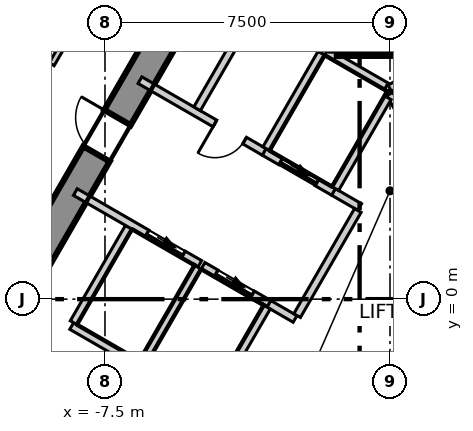
"""IFC4 building model, lengths in metres.
Left out: names, types, materials, properties, quantities, classifications, styles, units other than length and angle.
Written with IfcOpenShell. Run it as: python <this file> out.ifc"""

import sys

from ifc_helpers import new_model, si_unit, direction, frame, frame_2d, origin, place, context, subcontext, project, spatial, polyline, rectangle, outline, extrude, element, fill, save


model = new_model("IFC4")
c1 = context("Model", 3, precision=1e-05, world=origin(), true_north=direction((0.0, 1.0)))
c2 = subcontext(c1, "Body", "Model", "MODEL_VIEW")
j1 = project(units=[si_unit("LENGTHUNIT", "METRE"), si_unit("PLANEANGLEUNIT", "RADIAN")], contexts=[c1])
p1 = place(None, origin())
s1 = spatial("IfcSite", under=j1, at=p1, CompositionType="ELEMENT")
p2 = place(p1, origin())
s2 = spatial("IfcBuilding", under=s1, at=p2, CompositionType="ELEMENT")
p3 = place(p2, frame((0.0, 0.0, 164.3)))
s3 = spatial("IfcBuildingStorey", under=s2, at=p3, CompositionType="ELEMENT", Elevation=164.3)
p4 = place(p3, frame((-1.674, 14.3, -0.3), z_axis=(0.0, 0.0, 1.0), x_axis=(-0.499995765644, -0.866027848477, 0.0)))
e1 = element("IfcWall", 1, at=p4, inside=s3, PredefinedType="SHEAR", context=c2, shape_type="SweptSolid", body=[
    extrude(outline(polyline([(-0.231, -0.4), (1.732, -0.4), (3.695, -0.4), (5.658, -0.4), (7.621, -0.4), (9.584, -0.4), (11.547, -0.4), (13.51, -0.4), (15.473, -0.4), (17.436, -0.4), (19.399, -0.4), (21.362, -0.4), (23.325, -0.4), (22.863, 0.4), (20.977, 0.4), (19.091, 0.4), (17.205, 0.4), (15.319, 0.4), (13.433, 0.4), (11.547, 0.4), (9.661, 0.4), (7.775, 0.4), (5.889, 0.4), (4.003, 0.4), (2.117, 0.4), (0.231, 0.4), (-0.231, -0.4)])), origin(), (0.0, 0.0, 1.0), 4.0),
])
p5 = place(p4, frame((10.997, 0.0, 0.3)))
e2 = element("IfcOpeningElement", 2, at=p5, cuts=e1, PredefinedType="OPENING", context=c2, shape_type="SweptSolid", body=[
    extrude(rectangle(XDim=1.1, YDim=2.1, at=frame_2d((0.55, 1.05))), frame((0.0, 0.41, 0.0), z_axis=(0.0, -1.0, 0.0), x_axis=(1.0, 0.0, 0.0)), (0.0, 0.0, 1.0), 0.82),
])
p6 = place(p3, frame((-2.972, 33.16, 0.0), z_axis=(0.0, 0.0, 1.0), x_axis=(-0.500009959561, -0.866019653553, 0.0)))
e3 = element("IfcWall", 3, at=p6, inside=s3, PredefinedType="ELEMENTEDWALL", context=c2, shape_type="SweptSolid", body=[
    extrude(rectangle(XDim=54.443, YDim=0.2, at=frame_2d((27.222, 0.0))), origin(), (0.0, 0.0, 1.0), 3.7),
])
p7 = place(p6, frame((2.094, 0.0, 0.9)))
e4 = element("IfcOpeningElement", 4, at=p7, cuts=e3, PredefinedType="OPENING", context=c2, shape_type="SweptSolid", body=[
    extrude(rectangle(XDim=4.9, YDim=2.5, at=frame_2d((2.45, 1.25))), frame((0.0, 0.11, 0.0), z_axis=(0.0, -1.0, 0.0), x_axis=(1.0, 0.0, 0.0)), (0.0, 0.0, 1.0), 0.22),
])
p8 = place(p6, frame((8.576, 0.0, 0.9)))
e5 = element("IfcOpeningElement", 5, at=p8, cuts=e3, PredefinedType="OPENING", context=c2, shape_type="SweptSolid", body=[
    extrude(rectangle(XDim=4.9, YDim=2.5, at=frame_2d((2.45, 1.25))), frame((0.0, 0.11, 0.0), z_axis=(0.0, -1.0, 0.0), x_axis=(1.0, 0.0, 0.0)), (0.0, 0.0, 1.0), 0.22),
])
p9 = place(p6, frame((15.058, 0.0, 0.9)))
e6 = element("IfcOpeningElement", 6, at=p9, cuts=e3, PredefinedType="OPENING", context=c2, shape_type="SweptSolid", body=[
    extrude(rectangle(XDim=4.9, YDim=2.5, at=frame_2d((2.45, 1.25))), frame((0.0, 0.11, 0.0), z_axis=(0.0, -1.0, 0.0), x_axis=(1.0, 0.0, 0.0)), (0.0, 0.0, 1.0), 0.22),
])
p10 = place(p6, frame((21.54, 0.0, 0.9)))
e7 = element("IfcOpeningElement", 7, at=p10, cuts=e3, PredefinedType="OPENING", context=c2, shape_type="SweptSolid", body=[
    extrude(rectangle(XDim=4.9, YDim=2.5, at=frame_2d((2.45, 1.25))), frame((0.0, 0.11, 0.0), z_axis=(0.0, -1.0, 0.0), x_axis=(1.0, 0.0, 0.0)), (0.0, 0.0, 1.0), 0.22),
])
p11 = place(p6, frame((28.022, 0.0, 0.9)))
e8 = element("IfcOpeningElement", 8, at=p11, cuts=e3, PredefinedType="OPENING", context=c2, shape_type="SweptSolid", body=[
    extrude(rectangle(XDim=4.9, YDim=2.5, at=frame_2d((2.45, 1.25))), frame((0.0, 0.11, 0.0), z_axis=(0.0, -1.0, 0.0), x_axis=(1.0, 0.0, 0.0)), (0.0, 0.0, 1.0), 0.22),
])
p12 = place(p6, frame((34.505, 0.0, 0.9)))
e9 = element("IfcOpeningElement", 9, at=p12, cuts=e3, PredefinedType="OPENING", context=c2, shape_type="SweptSolid", body=[
    extrude(rectangle(XDim=4.9, YDim=2.5, at=frame_2d((2.45, 1.25))), frame((0.0, 0.11, 0.0), z_axis=(0.0, -1.0, 0.0), x_axis=(1.0, 0.0, 0.0)), (0.0, 0.0, 1.0), 0.22),
])
p13 = place(p6, frame((40.987, 0.0, 0.9)))
e10 = element("IfcOpeningElement", 10, at=p13, cuts=e3, PredefinedType="OPENING", context=c2, shape_type="SweptSolid", body=[
    extrude(rectangle(XDim=4.9, YDim=2.5, at=frame_2d((2.45, 1.25))), frame((0.0, 0.11, 0.0), z_axis=(0.0, -1.0, 0.0), x_axis=(1.0, 0.0, 0.0)), (0.0, 0.0, 1.0), 0.22),
])
p14 = place(p6, frame((47.469, 0.0, 0.9)))
e11 = element("IfcOpeningElement", 11, at=p14, cuts=e3, PredefinedType="OPENING", context=c2, shape_type="SweptSolid", body=[
    extrude(rectangle(XDim=4.9, YDim=2.5, at=frame_2d((2.45, 1.25))), frame((0.0, 0.11, 0.0), z_axis=(0.0, -1.0, 0.0), x_axis=(1.0, 0.0, 0.0)), (0.0, 0.0, 1.0), 0.22),
])
p15 = place(p3, frame((-8.903, 6.18, 0.0), z_axis=(0.0, 0.0, 1.0), x_axis=(0.500010074151, 0.866019587393, 0.0)))
e12 = element("IfcWall", 12, at=p15, inside=s3, PredefinedType="PARTITIONING", context=c2, shape_type="SweptSolid", body=[
    extrude(rectangle(XDim=17.806, YDim=0.15, at=frame_2d((8.903, 0.0))), origin(), (0.0, 0.0, 1.0), 3.7),
])
p16 = place(p15, frame((14.356, 0.0, 0.0)))
e13 = element("IfcOpeningElement", 13, at=p16, cuts=e12, PredefinedType="OPENING", context=c2, shape_type="SweptSolid", body=[
    extrude(rectangle(XDim=1.1, YDim=2.1, at=frame_2d((0.55, 1.05))), frame((0.0, 0.085, 0.0), z_axis=(0.0, -1.0, 0.0), x_axis=(1.0, 0.0, 0.0)), (0.0, 0.0, 1.0), 0.17),
])
p17 = place(p15, frame((10.014, 0.0, 0.0)))
e14 = element("IfcOpeningElement", 14, at=p17, cuts=e12, PredefinedType="OPENING", context=c2, shape_type="SweptSolid", body=[
    extrude(rectangle(XDim=0.9, YDim=2.1, at=frame_2d((0.45, 1.05))), frame((0.0, 0.085, 0.0), z_axis=(0.0, -1.0, 0.0), x_axis=(1.0, 0.0, 0.0)), (0.0, 0.0, 1.0), 0.17),
])
p18 = place(p15, frame((6.814, 0.0, 0.0)))
e15 = element("IfcOpeningElement", 15, at=p18, cuts=e12, PredefinedType="OPENING", context=c2, shape_type="SweptSolid", body=[
    extrude(rectangle(XDim=0.9, YDim=2.1, at=frame_2d((0.45, 1.05))), frame((0.0, 0.085, 0.0), z_axis=(0.0, -1.0, 0.0), x_axis=(1.0, 0.0, 0.0)), (0.0, 0.0, 1.0), 0.17),
])
p19 = place(p15, frame((4.014, 0.0, 0.0)))
e16 = element("IfcOpeningElement", 16, at=p19, cuts=e12, PredefinedType="OPENING", context=c2, shape_type="SweptSolid", body=[
    extrude(rectangle(XDim=1.0, YDim=2.1, at=frame_2d((0.5, 1.05))), frame((0.0, 0.085, 0.0), z_axis=(0.0, -1.0, 0.0), x_axis=(1.0, 0.0, 0.0)), (0.0, 0.0, 1.0), 0.17),
])
p20 = place(p3, frame((0.076, 21.468, 0.0), z_axis=(0.0, 0.0, 1.0), x_axis=(0.500024127084, -0.866011473558, 0.0)))
e17 = element("IfcWall", 17, at=p20, inside=s3, PredefinedType="PARTITIONING", context=c2, shape_type="SweptSolid", body=[
    extrude(rectangle(XDim=17.654, YDim=0.15, at=frame_2d((8.827, 0.0))), origin(), (0.0, 0.0, 1.0), 3.7),
])
p21 = place(p20, frame((11.104, 0.0, 0.0)))
e18 = element("IfcOpeningElement", 18, at=p21, cuts=e17, PredefinedType="OPENING", context=c2, shape_type="SweptSolid", body=[
    extrude(rectangle(XDim=1.1, YDim=2.1, at=frame_2d((0.55, 1.05))), frame((0.0, 0.085, 0.0), z_axis=(0.0, -1.0, 0.0), x_axis=(1.0, 0.0, 0.0)), (0.0, 0.0, 1.0), 0.17),
])
p22 = place(p20, frame((2.14, 0.0, 0.0)))
e19 = element("IfcOpeningElement", 19, at=p22, cuts=e17, PredefinedType="OPENING", context=c2, shape_type="SweptSolid", body=[
    extrude(rectangle(XDim=1.1, YDim=2.1, at=frame_2d((0.55, 1.05))), frame((0.0, 0.085, 0.0), z_axis=(0.0, -1.0, 0.0), x_axis=(1.0, 0.0, 0.0)), (0.0, 0.0, 1.0), 0.17),
])
p23 = place(p3, frame((-8.376, -0.707, 0.0), z_axis=(0.0, 0.0, 1.0), x_axis=(0.866067520717, -0.499927044236, 0.0)))
e20 = element("IfcWall", 20, at=p23, inside=s3, PredefinedType="SOLIDWALL", context=c2, shape_type="SweptSolid", body=[
    extrude(rectangle(XDim=2.1, YDim=0.2, at=frame_2d((1.05, 0.0))), origin(), (0.0, 0.0, 1.0), 3.7),
])
p24 = place(p3, frame((-8.326, -0.62, 0.0), z_axis=(0.0, 0.0, 1.0), x_axis=(0.500023687443, 0.866011727401, 0.0)))
e21 = element("IfcWall", 21, at=p24, inside=s3, PredefinedType="SOLIDWALL", context=c2, shape_type="SweptSolid", body=[
    extrude(rectangle(XDim=2.9, YDim=0.2, at=frame_2d((1.45, 0.0))), origin(), (0.0, 0.0, 1.0), 3.7),
])
p25 = place(p3, frame((-0.002, 5.542, 0.0), z_axis=(0.0, 0.0, 1.0), x_axis=(0.866103910842, 0.499863997127, 0.0)))
e22 = element("IfcWall", 22, at=p25, inside=s3, PredefinedType="SOLIDWALL", context=c2, shape_type="SweptSolid", body=[
    extrude(rectangle(XDim=4.131, YDim=0.2, at=frame_2d((2.065, 0.0))), origin(), (0.0, 0.0, 1.0), 3.7),
])
p26 = place(p3, frame((0.0, 5.4, 0.0), z_axis=(0.0, 0.0, 1.0), x_axis=(0.500103862429, -0.865965430478, 0.0)))
e23 = element("IfcWall", 23, at=p26, inside=s3, PredefinedType="SOLIDWALL", context=c2, shape_type="SweptSolid", body=[
    extrude(rectangle(XDim=2.973, YDim=0.2, at=frame_2d((1.487, 0.0))), origin(), (0.0, 0.0, 1.0), 3.7),
])
p27 = place(p26, frame((0.937, 0.0, 0.0)))
e24 = element("IfcOpeningElement", 24, at=p27, cuts=e23, PredefinedType="OPENING", context=c2, shape_type="SweptSolid", body=[
    extrude(rectangle(XDim=1.1, YDim=2.1, at=frame_2d((0.55, 1.05))), frame((0.0, 0.11, 0.0), z_axis=(0.0, -1.0, 0.0), x_axis=(1.0, 0.0, 0.0)), (0.0, 0.0, 1.0), 0.22),
])
p28 = place(p3, frame((-8.28, 2.818, 0.0), z_axis=(0.0, 0.0, 1.0), x_axis=(0.86600175068, -0.50004096614, 0.0)))
e25 = element("IfcWall", 25, at=p28, inside=s3, PredefinedType="SOLIDWALL", context=c2, shape_type="SweptSolid", body=[
    extrude(rectangle(XDim=3.782, YDim=0.2, at=frame_2d((1.891, 0.0))), origin(), (0.0, 0.0, 1.0), 3.7),
])
p29 = place(p28, frame((2.18, 0.0, 0.0)))
e26 = element("IfcOpeningElement", 26, at=p29, cuts=e25, PredefinedType="OPENING", context=c2, shape_type="SweptSolid", body=[
    extrude(rectangle(XDim=1.1, YDim=2.1, at=frame_2d((0.55, 1.05))), frame((0.0, 0.11, 0.0), z_axis=(0.0, -1.0, 0.0), x_axis=(1.0, 0.0, 0.0)), (0.0, 0.0, 1.0), 0.22),
])
p30 = place(p3, frame((-3.188, -0.122, 0.0), z_axis=(0.0, 0.0, 1.0), x_axis=(0.865705793592, -0.50055317294, 0.0)))
e27 = element("IfcWall", 27, at=p30, inside=s3, PredefinedType="SOLIDWALL", context=c2, shape_type="SweptSolid", body=[
    extrude(rectangle(XDim=0.797, YDim=0.2, at=frame_2d((0.398, 0.0))), origin(), (0.0, 0.0, 1.0), 3.7),
])
p31 = place(p3, frame((-6.58, 5.762, 0.0), z_axis=(0.0, 0.0, 1.0), x_axis=(0.866029704776, -0.49999255039, 0.0)))
e28 = element("IfcWall", 28, at=p31, inside=s3, PredefinedType="SOLIDWALL", context=c2, shape_type="SweptSolid", body=[
    extrude(rectangle(XDim=3.782, YDim=0.2, at=frame_2d((1.891, 0.0))), origin(), (0.0, 0.0, 1.0), 3.7),
])
p32 = place(p31, frame((2.279, 0.0, 0.0)))
e29 = element("IfcOpeningElement", 29, at=p32, cuts=e28, PredefinedType="OPENING", context=c2, shape_type="SweptSolid", body=[
    extrude(rectangle(XDim=0.9, YDim=2.1, at=frame_2d((0.45, 1.05))), frame((0.0, 0.11, 0.0), z_axis=(0.0, -1.0, 0.0), x_axis=(1.0, 0.0, 0.0)), (0.0, 0.0, 1.0), 0.22),
])
p33 = place(p3, frame((-1.488, 2.822, 0.0), z_axis=(0.0, 0.0, 1.0), x_axis=(0.866236612152, -0.499633997809, 0.0)))
e30 = element("IfcWall", 30, at=p33, inside=s3, PredefinedType="SOLIDWALL", context=c2, shape_type="SweptSolid", body=[
    extrude(rectangle(XDim=0.796, YDim=0.2, at=frame_2d((0.398, 0.0))), origin(), (0.0, 0.0, 1.0), 3.7),
])
p34 = place(p3, frame((-5.076, 5.009, 0.0), z_axis=(0.0, 0.0, 1.0), x_axis=(0.50002537861, 0.866010750942, 0.0)))
e31 = element("IfcWall", 31, at=p34, inside=s3, PredefinedType="SOLIDWALL", context=c2, shape_type="SweptSolid", body=[
    extrude(rectangle(XDim=3.0, YDim=0.2, at=frame_2d((1.5, 0.0))), origin(), (0.0, 0.0, 1.0), 3.7),
])
p35 = place(p3, frame((-3.489, 7.557, 0.0), z_axis=(0.0, 0.0, 1.0), x_axis=(0.866010750942, -0.50002537861, 0.0)))
e32 = element("IfcWall", 32, at=p35, inside=s3, PredefinedType="SOLIDWALL", context=c2, shape_type="SweptSolid", body=[
    extrude(rectangle(XDim=2.0, YDim=0.2, at=frame_2d((1.0, 0.0))), origin(), (0.0, 0.0, 1.0), 3.7),
])
p36 = place(p3, frame((-2.444, -0.433, 0.0), z_axis=(0.0, 0.0, 1.0), x_axis=(0.500035624827, 0.866004834804, 0.0)))
e33 = element("IfcWall", 33, at=p36, inside=s3, PredefinedType="SOLIDWALL", context=c2, shape_type="SweptSolid", body=[
    extrude(rectangle(XDim=3.194, YDim=0.2, at=frame_2d((1.597, 0.0))), origin(), (0.0, 0.0, 1.0), 3.7),
])
p37 = place(p3, frame((-6.507, -1.67, 0.0), z_axis=(0.0, 0.0, 1.0), x_axis=(0.50012328804, 0.865954211699, 0.0)))
e34 = element("IfcWall", 34, at=p37, inside=s3, PredefinedType="SOLIDWALL", context=c2, shape_type="SweptSolid", body=[
    extrude(rectangle(XDim=2.9, YDim=0.2, at=frame_2d((1.45, 0.0))), origin(), (0.0, 0.0, 1.0), 3.7),
])
p38 = place(p3, frame((-4.92, 0.878, 0.0), z_axis=(0.0, 0.0, 1.0), x_axis=(0.866010750942, -0.50002537861, 0.0)))
e35 = element("IfcWall", 35, at=p38, inside=s3, PredefinedType="SOLIDWALL", context=c2, shape_type="SweptSolid", body=[
    extrude(rectangle(XDim=2.0, YDim=0.2, at=frame_2d((1.0, 0.0))), origin(), (0.0, 0.0, 1.0), 3.7),
])
p39 = place(p38, frame((0.4, 0.0, 0.0)))
e36 = element("IfcOpeningElement", 36, at=p39, cuts=e35, PredefinedType="OPENING", context=c2, shape_type="SweptSolid", body=[
    extrude(rectangle(XDim=1.1, YDim=2.1, at=frame_2d((0.55, 1.05))), frame((0.0, 0.11, 0.0), z_axis=(0.0, -1.0, 0.0), x_axis=(1.0, 0.0, 0.0)), (0.0, 0.0, 1.0), 0.22),
])
p40 = place(p3, frame((-4.619, -2.6, 0.0), z_axis=(0.0, 0.0, 1.0), x_axis=(0.50009492287, 0.865970593103, 0.0)))
e37 = element("IfcWall", 37, at=p40, inside=s3, PredefinedType="SOLIDWALL", context=c2, shape_type="SweptSolid", body=[
    extrude(rectangle(XDim=2.761, YDim=0.2, at=frame_2d((1.381, 0.0))), origin(), (0.0, 0.0, 1.0), 3.7),
])
p41 = place(p3, frame((-3.309, 3.873, 0.0), z_axis=(0.0, 0.0, 1.0), x_axis=(0.866098583652, -0.499873227325, 0.0)))
e38 = element("IfcWall", 38, at=p41, inside=s3, PredefinedType="SOLIDWALL", context=c2, shape_type="SweptSolid", body=[
    extrude(rectangle(XDim=2.103, YDim=0.2, at=frame_2d((1.051, 0.0))), origin(), (0.0, 0.0, 1.0), 3.7),
])
p42 = place(p41, frame((0.502, 0.0, 0.0)))
e39 = element("IfcOpeningElement", 39, at=p42, cuts=e38, PredefinedType="OPENING", context=c2, shape_type="SweptSolid", body=[
    extrude(rectangle(XDim=1.1, YDim=2.1, at=frame_2d((0.55, 1.05))), frame((0.0, 0.11, 0.0), z_axis=(0.0, -1.0, 0.0), x_axis=(1.0, 0.0, 0.0)), (0.0, 0.0, 1.0), 0.22),
])
p43 = place(p3, frame((-3.257, 3.959, 0.0), z_axis=(0.0, 0.0, 1.0), x_axis=(0.50012328804, 0.865954211699, 0.0)))
e40 = element("IfcWall", 40, at=p43, inside=s3, PredefinedType="SOLIDWALL", context=c2, shape_type="SweptSolid", body=[
    extrude(rectangle(XDim=2.9, YDim=0.2, at=frame_2d((1.45, 0.0))), origin(), (0.0, 0.0, 1.0), 3.7),
])
p44 = place(p3, frame((-1.67, 6.507, 0.0), z_axis=(0.0, 0.0, 1.0), x_axis=(0.865941441609, -0.500145398563, 0.0)))
e41 = element("IfcWall", 41, at=p44, inside=s3, PredefinedType="SOLIDWALL", context=c2, shape_type="SweptSolid", body=[
    extrude(rectangle(XDim=1.815, YDim=0.2, at=frame_2d((0.908, 0.0))), origin(), (0.0, 0.0, 1.0), 3.7),
])
p45 = place(p3, frame((-1.438, 2.909, 0.0), z_axis=(0.0, 0.0, 1.0), x_axis=(0.499829630636, 0.866123744241, 0.0)))
e42 = element("IfcWall", 42, at=p45, inside=s3, PredefinedType="SOLIDWALL", context=c2, shape_type="SweptSolid", body=[
    extrude(rectangle(XDim=2.761, YDim=0.2, at=frame_2d((1.38, 0.0))), origin(), (0.0, 0.0, 1.0), 3.7),
])
p46 = place(p3, frame((-1.4, 6.5, 0.0), z_axis=(0.0, 0.0, 1.0), x_axis=(1.0, 0.0, 0.0)))
e43 = element("IfcWall", 43, at=p46, inside=s3, PredefinedType="SOLIDWALL", context=c2, shape_type="SweptSolid", body=[
    extrude(rectangle(XDim=2.8, YDim=0.2, at=frame_2d((1.4, 0.0))), origin(), (0.0, 0.0, 1.0), 3.7),
])
p47 = place(p39, origin())
e44 = element("IfcDoor", 44, at=p47, inside=s3, OperationType="SLIDING_TO_LEFT", PredefinedType="DOOR", context=c2, shape_type="SweptSolid", body=[
    extrude(rectangle(XDim=1.1, YDim=2.1, at=frame_2d((0.55, 1.05))), frame((0.0, 0.025, 0.0), z_axis=(0.0, -1.0, 0.0), x_axis=(1.0, 0.0, 0.0)), (0.0, 0.0, 1.0), 0.05),
])
fill(e36, e44)
p48 = place(p42, origin())
e45 = element("IfcDoor", 45, at=p48, inside=s3, OperationType="SLIDING_TO_LEFT", PredefinedType="DOOR", context=c2, shape_type="SweptSolid", body=[
    extrude(rectangle(XDim=1.1, YDim=2.1, at=frame_2d((0.55, 1.05))), frame((0.0, 0.025, 0.0), z_axis=(0.0, -1.0, 0.0), x_axis=(1.0, 0.0, 0.0)), (0.0, 0.0, 1.0), 0.05),
])
fill(e39, e45)
p49 = place(p29, origin())
e46 = element("IfcDoor", 46, at=p49, inside=s3, OperationType="SLIDING_TO_LEFT", PredefinedType="DOOR", context=c2, shape_type="SweptSolid", body=[
    extrude(rectangle(XDim=1.1, YDim=2.1, at=frame_2d((0.55, 1.05))), frame((0.0, 0.025, 0.0), z_axis=(0.0, -1.0, 0.0), x_axis=(1.0, 0.0, 0.0)), (0.0, 0.0, 1.0), 0.05),
])
fill(e26, e46)
p50 = place(p32, origin())
e47 = element("IfcDoor", 47, at=p50, inside=s3, OperationType="SINGLE_SWING_LEFT", PredefinedType="DOOR", context=c2, shape_type="SweptSolid", body=[
    extrude(rectangle(XDim=0.9, YDim=2.1, at=frame_2d((0.45, 1.05))), frame((0.0, 0.025, 0.0), z_axis=(0.0, -1.0, 0.0), x_axis=(1.0, 0.0, 0.0)), (0.0, 0.0, 1.0), 0.05),
])
fill(e29, e47)
p51 = place(p5, origin())
e48 = element("IfcDoor", 48, at=p51, inside=s3, OperationType="SINGLE_SWING_LEFT", PredefinedType="DOOR", context=c2, shape_type="SweptSolid", body=[
    extrude(rectangle(XDim=1.1, YDim=2.1, at=frame_2d((0.55, 1.05))), frame((0.0, 0.025, 0.0), z_axis=(0.0, -1.0, 0.0), x_axis=(1.0, 0.0, 0.0)), (0.0, 0.0, 1.0), 0.05),
])
fill(e2, e48)
save(model, sys.argv[1])
